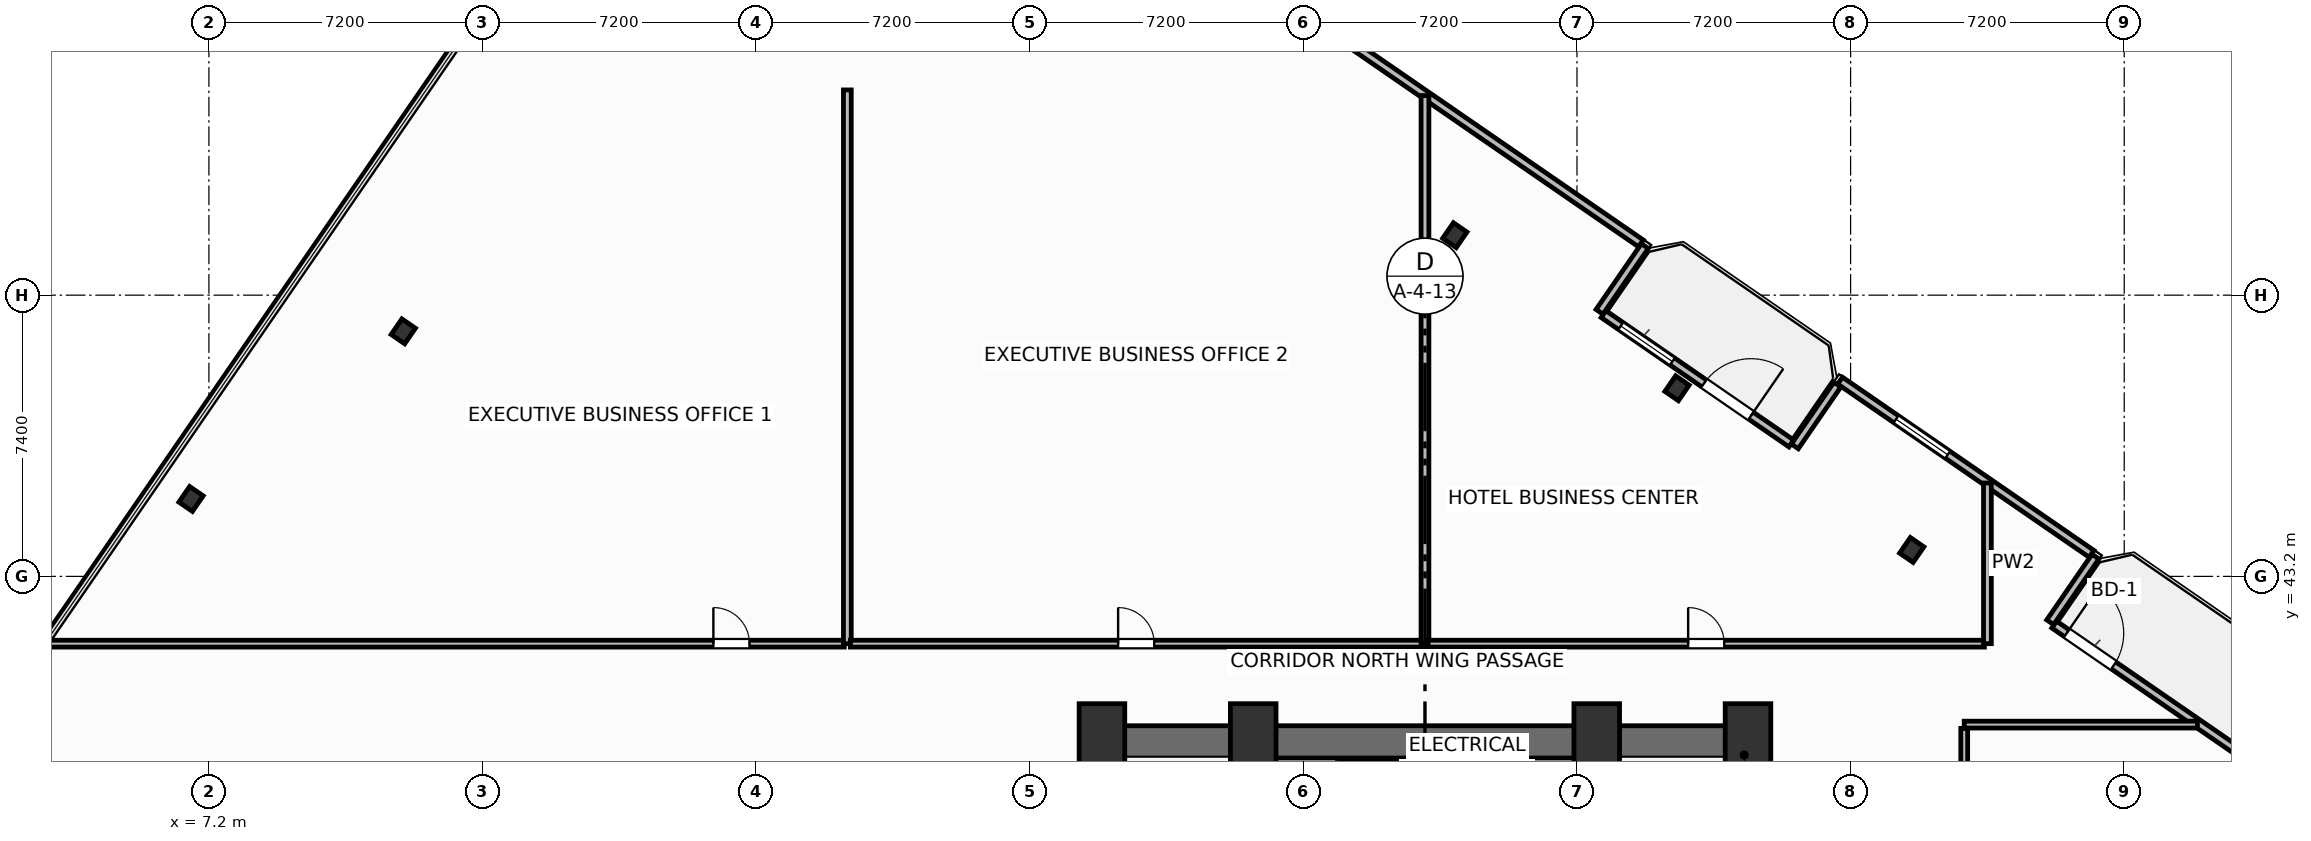
"""IFC4 building model, lengths in metres.
Left out: names, types, materials, properties, quantities, classifications, styles, units other than length and angle.
Written with IfcOpenShell. Run it as: python <this file> out.ifc"""

import sys

from ifc_helpers import new_model, si_unit, direction, frame, frame_2d, origin, origin_2d, place, context, subcontext, project, spatial, rectangle, i_section, extrude, element, fill, save


model = new_model("IFC4")
c1 = context("Model", 3, precision=1e-05, world=origin(), true_north=direction((0.0, 1.0)))
c2 = subcontext(c1, "Body", "Model", "MODEL_VIEW")
j1 = project(units=[si_unit("LENGTHUNIT", "METRE"), si_unit("PLANEANGLEUNIT", "RADIAN")], contexts=[c1])
p1 = place(None, origin())
s1 = spatial("IfcSite", under=j1, at=p1, CompositionType="ELEMENT")
p2 = place(p1, origin())
s2 = spatial("IfcBuilding", under=s1, at=p2, CompositionType="ELEMENT")
p3 = place(p2, frame((0.0, 0.0, 45.5)))
s3 = spatial("IfcBuildingStorey", under=s2, at=p3, CompositionType="ELEMENT", Elevation=45.5)
for number, where, z_axis, x_axis in (
    (1, (30.7, 39.05, 0.0), (0.0, 0.0, 1.0), (1.0, 0.0, 0.0)),
    (2, (34.68, 39.05, 0.0), (0.0, 0.0, 1.0), (1.0, 0.0, 0.0)),
    (3, (43.72, 39.05, 0.0), (0.0, 0.0, 1.0), (1.0, 0.0, 0.0)),
    (4, (47.7, 39.05, 0.0), (0.0, 0.0, 1.0), (1.0, 0.0, 0.0)),
):
    element("IfcColumn", number, at=place(p3, frame(where, z_axis=z_axis, x_axis=x_axis)), inside=s3, PredefinedType="COLUMN", context=c2, shape_type="SweptSolid", body=[
        extrude(rectangle(XDim=1.2, YDim=1.6, at=origin_2d()), origin(), (0.0, 0.0, 1.0), 3.7),
    ])
p4 = place(p3, frame((30.28, 38.845, 0.0), z_axis=(0.0, 0.0, 1.0), x_axis=(1.0, 0.0, 0.0)))
e5 = element("IfcWall", 5, at=p4, inside=s3, PredefinedType="SHEAR", context=c2, shape_type="SweptSolid", body=[
    extrude(rectangle(XDim=17.84, YDim=0.85, at=frame_2d((8.92, 0.0))), origin(), (0.0, 0.0, 1.0), 3.45),
])
for number, where, z_axis, x_axis in (
    (6, (30.705, 29.2, 0.0), (0.0, 0.0, 1.0), (0.0, 1.0, 0.0)),
    (7, (47.695, 29.2, 0.0), (0.0, 0.0, 1.0), (0.0, 1.0, 0.0)),
):
    element("IfcWall", number, at=place(p3, frame(where, z_axis=z_axis, x_axis=x_axis)), inside=s3, PredefinedType="SHEAR", context=c2, shape_type="SweptSolid", body=[
        extrude(rectangle(XDim=9.22, YDim=0.85, at=frame_2d((4.61, 0.0))), origin(), (0.0, 0.0, 1.0), 3.45),
    ])
p5 = place(p3, frame((34.64, 29.2, 0.0), z_axis=(0.0, 0.0, 1.0), x_axis=(0.0, 1.0, 0.0)))
e8 = element("IfcWall", 8, at=p5, inside=s3, PredefinedType="SHEAR", context=c2, shape_type="SweptSolid", body=[
    extrude(rectangle(XDim=9.22, YDim=0.25, at=frame_2d((4.61, 0.0))), origin(), (0.0, 0.0, 1.0), 3.45),
])
p6 = place(p5, frame((0.65, 0.0, 0.0)))
e9 = element("IfcOpeningElement", 9, at=p6, cuts=e8, PredefinedType="OPENING", context=c2, shape_type="SweptSolid", body=[
    extrude(rectangle(XDim=1.05, YDim=2.15, at=frame_2d((0.525, 1.075))), frame((0.0, 0.135, 0.0), z_axis=(0.0, -1.0, 0.0), x_axis=(1.0, 0.0, 0.0)), (0.0, 0.0, 1.0), 0.27),
])
p7 = place(p3, frame((43.76, 29.2, 0.0), z_axis=(0.0, 0.0, 1.0), x_axis=(0.0, 1.0, 0.0)))
e10 = element("IfcWall", 10, at=p7, inside=s3, PredefinedType="SHEAR", context=c2, shape_type="SweptSolid", body=[
    extrude(rectangle(XDim=9.22, YDim=0.25, at=frame_2d((4.61, 0.0))), origin(), (0.0, 0.0, 1.0), 3.45),
])
p8 = place(p7, frame((0.65, 0.0, 0.0)))
e11 = element("IfcOpeningElement", 11, at=p8, cuts=e10, PredefinedType="OPENING", context=c2, shape_type="SweptSolid", body=[
    extrude(rectangle(XDim=1.05, YDim=2.15, at=frame_2d((0.525, 1.075))), frame((0.0, 0.135, 0.0), z_axis=(0.0, -1.0, 0.0), x_axis=(1.0, 0.0, 0.0)), (0.0, 0.0, 1.0), 0.27),
])
for number, where, z_axis, x_axis in (
    (12, (52.009, 43.896, 0.0), (0.0, 0.0, 1.0), (0.824, -0.567, 0.0)),
    (13, (45.833, 48.15, 0.0), (0.0, 0.0, 1.0), (0.824, -0.567, 0.0)),
    (14, (39.985, 52.177, 0.0), (0.0, 0.0, 1.0), (0.824, -0.567, 0.0)),
    (15, (12.315, 49.647, 0.0), (0.0, 0.0, 1.0), (0.824, -0.567, 0.0)),
    (16, (6.73, 45.238, 0.0), (0.0, 0.0, 1.0), (0.824, -0.567, 0.0)),
):
    element("IfcColumn", number, at=place(p3, frame(where, z_axis=z_axis, x_axis=x_axis)), inside=s3, PredefinedType="COLUMN", context=c2, shape_type="SweptSolid", body=[
        extrude(i_section(OverallWidth=0.432, OverallDepth=0.498, WebThickness=0.056, FlangeThickness=0.089, FilletRadius=0.025, at=origin_2d()), origin(), (0.0, 0.0, 1.0), 3.7),
    ])
p9 = place(p3, frame((43.898, 50.102, 0.0), z_axis=(0.0, 0.0, 1.0), x_axis=(0.823534636215, -0.567265989598, 0.0)))
e17 = element("IfcWall", 17, at=p9, inside=s3, PredefinedType="SOLIDWALL", context=c2, shape_type="SweptSolid", body=[
    extrude(rectangle(XDim=6.0, YDim=0.22, at=frame_2d((3.0, 0.0))), origin(), (0.0, 0.0, 1.0), 2.73),
])
p10 = place(p9, frame((3.212, 0.0, 0.0)))
e18 = element("IfcOpeningElement", 18, at=p10, cuts=e17, PredefinedType="OPENING", context=c2, shape_type="SweptSolid", body=[
    extrude(rectangle(XDim=1.5, YDim=2.25, at=frame_2d((0.75, 1.125))), frame((0.0, 0.12, 0.0), z_axis=(0.0, -1.0, 0.0), x_axis=(1.0, 0.0, 0.0)), (0.0, 0.0, 1.0), 0.24),
])
p11 = place(p9, frame((0.55, 0.0, 0.75)))
e19 = element("IfcOpeningElement", 19, at=p11, cuts=e17, PredefinedType="OPENING", context=c2, shape_type="SweptSolid", body=[
    extrude(rectangle(XDim=1.65, YDim=1.65, at=frame_2d((0.825, 0.825))), frame((0.0, 0.12, 0.0), z_axis=(0.0, -1.0, 0.0), x_axis=(1.0, 0.0, 0.0)), (0.0, 0.0, 1.0), 0.24),
])
p12 = place(p3, frame((55.757, 41.933, 0.0), z_axis=(0.0, 0.0, 1.0), x_axis=(0.823534636215, -0.567265989598, 0.0)))
e20 = element("IfcWall", 20, at=p12, inside=s3, PredefinedType="SOLIDWALL", context=c2, shape_type="SweptSolid", body=[
    extrude(rectangle(XDim=6.0, YDim=0.22, at=frame_2d((3.0, 0.0))), origin(), (0.0, 0.0, 1.0), 2.73),
])
p13 = place(p12, frame((0.4, 0.0, 0.0)))
e21 = element("IfcOpeningElement", 21, at=p13, cuts=e20, PredefinedType="OPENING", context=c2, shape_type="SweptSolid", body=[
    extrude(rectangle(XDim=1.5, YDim=2.25, at=frame_2d((0.75, 1.125))), frame((0.0, 0.12, 0.0), z_axis=(0.0, -1.0, 0.0), x_axis=(1.0, 0.0, 0.0)), (0.0, 0.0, 1.0), 0.24),
])
p14 = place(p3, frame((55.653, 41.993, 0.0), z_axis=(0.0, 0.0, 1.0), x_axis=(0.567273696173, 0.823529327729, 0.0)))
e22 = element("IfcWall", 22, at=p14, inside=s3, PredefinedType="SOLIDWALL", context=c2, shape_type="SweptSolid", body=[
    extrude(rectangle(XDim=2.1, YDim=0.22, at=frame_2d((1.05, 0.0))), origin(), (0.0, 0.0, 1.0), 2.73),
])
p15 = place(p3, frame((56.741, 43.793, 0.0), z_axis=(0.0, 0.0, 1.0), x_axis=(-0.823530942962, 0.56727135128, 0.0)))
e23 = element("IfcWall", 23, at=p15, inside=s3, PredefinedType="SOLIDWALL", context=c2, shape_type="SweptSolid", body=[
    extrude(rectangle(XDim=8.035, YDim=0.22, at=frame_2d((4.018, 0.0))), origin(), (0.0, 0.0, 1.0), 2.73),
])
p16 = place(p15, frame((4.597, 0.0, 0.8)))
e24 = element("IfcOpeningElement", 24, at=p16, cuts=e23, PredefinedType="OPENING", context=c2, shape_type="SweptSolid", body=[
    extrude(rectangle(XDim=1.65, YDim=1.65, at=frame_2d((0.825, 0.825))), frame((0.0, 0.12, 0.0), z_axis=(0.0, -1.0, 0.0), x_axis=(1.0, 0.0, 0.0)), (0.0, 0.0, 1.0), 0.24),
])
p17 = place(p3, frame((50.053, 48.248, 0.0), z_axis=(0.0, 0.0, 1.0), x_axis=(-0.567273565974, -0.823529417415, 0.0)))
e25 = element("IfcWall", 25, at=p17, inside=s3, PredefinedType="SOLIDWALL", context=c2, shape_type="SweptSolid", body=[
    extrude(rectangle(XDim=1.975, YDim=0.22, at=frame_2d((0.988, 0.0))), origin(), (0.0, 0.0, 1.0), 2.73),
])
p18 = place(p3, frame((43.794, 50.161, 0.0), z_axis=(0.0, 0.0, 1.0), x_axis=(0.567352541689, 0.823475010816, 0.0)))
e26 = element("IfcWall", 26, at=p18, inside=s3, PredefinedType="SOLIDWALL", context=c2, shape_type="SweptSolid", body=[
    extrude(rectangle(XDim=2.1, YDim=0.22, at=frame_2d((1.05, 0.0))), origin(), (0.0, 0.0, 1.0), 2.73),
])
p19 = place(p3, frame((44.882, 51.962, 0.0), z_axis=(0.0, 0.0, 1.0), x_axis=(-0.823534427573, 0.567266292497, 0.0)))
e27 = element("IfcWall", 27, at=p19, inside=s3, PredefinedType="SOLIDWALL", context=c2, shape_type="SweptSolid", body=[
    extrude(rectangle(XDim=23.147, YDim=0.22, at=frame_2d((11.574, 0.0))), origin(), (0.0, 0.0, 1.0), 2.73),
])
p20 = place(p19, frame((10.749, 0.0, 0.8)))
e28 = element("IfcOpeningElement", 28, at=p20, cuts=e27, PredefinedType="OPENING", context=c2, shape_type="SweptSolid", body=[
    extrude(rectangle(XDim=1.65, YDim=1.65, at=frame_2d((0.825, 0.825))), frame((0.0, 0.12, 0.0), z_axis=(0.0, -1.0, 0.0), x_axis=(1.0, 0.0, 0.0)), (0.0, 0.0, 1.0), 0.24),
])
p21 = place(p3, frame((2.921, 41.43, 0.0), z_axis=(0.0, 0.0, 1.0), x_axis=(1.0, 0.0, 0.0)))
e29 = element("IfcWall", 29, at=p21, inside=s3, PredefinedType="PARTITIONING", context=c2, shape_type="SweptSolid", body=[
    extrude(rectangle(XDim=20.999, YDim=0.18, at=frame_2d((10.5, 0.0))), origin(), (0.0, 0.0, 1.0), 3.45),
])
p22 = place(p21, frame((17.554, 0.0, 0.0)))
e30 = element("IfcOpeningElement", 30, at=p22, cuts=e29, PredefinedType="OPENING", context=c2, shape_type="SweptSolid", body=[
    extrude(rectangle(XDim=0.95, YDim=2.05, at=frame_2d((0.475, 1.025))), frame((0.0, 0.1, 0.0), z_axis=(0.0, -1.0, 0.0), x_axis=(1.0, 0.0, 0.0)), (0.0, 0.0, 1.0), 0.2),
])
p23 = place(p3, frame((24.0, 41.43, 0.0), z_axis=(0.0, 0.0, 1.0), x_axis=(0.0, 1.0, 0.0)))
e31 = element("IfcWall", 31, at=p23, inside=s3, PredefinedType="PARTITIONING", context=c2, shape_type="SweptSolid", body=[
    extrude(rectangle(XDim=14.57, YDim=0.205, at=frame_2d((7.285, 0.0))), origin(), (0.0, 0.0, 1.0), 3.45),
])
p24 = place(p3, frame((24.08, 41.43, 0.0), z_axis=(0.0, 0.0, 1.0), x_axis=(1.0, 0.0, 0.0)))
e32 = element("IfcWall", 32, at=p24, inside=s3, PredefinedType="PARTITIONING", context=c2, shape_type="SweptSolid", body=[
    extrude(rectangle(XDim=15.04, YDim=0.18, at=frame_2d((7.52, 0.0))), origin(), (0.0, 0.0, 1.0), 3.45),
])
p25 = place(p24, frame((7.045, 0.0, 0.0)))
e33 = element("IfcOpeningElement", 33, at=p25, cuts=e32, PredefinedType="OPENING", context=c2, shape_type="SweptSolid", body=[
    extrude(rectangle(XDim=0.95, YDim=2.05, at=frame_2d((0.475, 1.025))), frame((0.0, 0.1, 0.0), z_axis=(0.0, -1.0, 0.0), x_axis=(1.0, 0.0, 0.0)), (0.0, 0.0, 1.0), 0.2),
])
p26 = place(p3, frame((39.2, 41.43, 0.0), z_axis=(0.0, 0.0, 1.0), x_axis=(0.0, 1.0, 0.0)))
e34 = element("IfcWall", 34, at=p26, inside=s3, PredefinedType="PARTITIONING", context=c2, shape_type="SweptSolid", body=[
    extrude(rectangle(XDim=14.421, YDim=0.205, at=frame_2d((7.211, 0.0))), origin(), (0.0, 0.0, 1.0), 3.45),
])
p27 = place(p3, frame((39.28, 41.43, 0.0), z_axis=(0.0, 0.0, 1.0), x_axis=(1.0, 0.0, 0.0)))
e35 = element("IfcWall", 35, at=p27, inside=s3, PredefinedType="PARTITIONING", context=c2, shape_type="SweptSolid", body=[
    extrude(rectangle(XDim=14.64, YDim=0.18, at=frame_2d((7.32, 0.0))), origin(), (0.0, 0.0, 1.0), 3.45),
])
p28 = place(p27, frame((6.845, 0.0, 0.0)))
e36 = element("IfcOpeningElement", 36, at=p28, cuts=e35, PredefinedType="OPENING", context=c2, shape_type="SweptSolid", body=[
    extrude(rectangle(XDim=0.95, YDim=2.05, at=frame_2d((0.475, 1.025))), frame((0.0, 0.1, 0.0), z_axis=(0.0, -1.0, 0.0), x_axis=(1.0, 0.0, 0.0)), (0.0, 0.0, 1.0), 0.2),
])
p29 = place(p3, frame((54.0, 41.43, 0.0), z_axis=(0.0, 0.0, 1.0), x_axis=(0.0, 1.0, 0.0)))
e37 = element("IfcWall", 37, at=p29, inside=s3, PredefinedType="PARTITIONING", context=c2, shape_type="SweptSolid", body=[
    extrude(rectangle(XDim=4.227, YDim=0.205, at=frame_2d((2.113, 0.0))), origin(), (0.0, 0.0, 1.0), 3.45),
])
p30 = place(p3, frame((53.39, 27.53, 0.0), z_axis=(0.0, 0.0, 1.0), x_axis=(0.0, 1.0, 0.0)))
e38 = element("IfcWall", 38, at=p30, inside=s3, PredefinedType="PARTITIONING", context=c2, shape_type="SweptSolid", body=[
    extrude(rectangle(XDim=11.67, YDim=0.18, at=frame_2d((5.835, 0.0))), origin(), (0.0, 0.0, 1.0), 3.45),
])
p31 = place(p30, frame((5.8, 0.0, 0.0)))
e39 = element("IfcOpeningElement", 39, at=p31, cuts=e38, PredefinedType="OPENING", context=c2, shape_type="SweptSolid", body=[
    extrude(rectangle(XDim=0.92, YDim=2.05, at=frame_2d((0.46, 1.025))), frame((0.0, 0.1, 0.0), z_axis=(0.0, -1.0, 0.0), x_axis=(1.0, 0.0, 0.0)), (0.0, 0.0, 1.0), 0.2),
])
p32 = place(p3, frame((53.39, 39.3, 0.0), z_axis=(0.0, 0.0, 1.0), x_axis=(1.0, 0.0, 0.0)))
e40 = element("IfcWall", 40, at=p32, inside=s3, PredefinedType="PARTITIONING", context=c2, shape_type="SweptSolid", body=[
    extrude(rectangle(XDim=6.136, YDim=0.18, at=frame_2d((3.068, 0.0))), origin(), (0.0, 0.0, 1.0), 3.45),
])
p33 = place(p10, origin())
e41 = element("IfcDoor", 41, at=p33, inside=s3, OperationType="SINGLE_SWING_RIGHT", PredefinedType="DOOR", context=c2, shape_type="SweptSolid", body=[
    extrude(rectangle(XDim=1.5, YDim=2.25, at=frame_2d((0.75, 1.125))), frame((0.0, 0.025, 0.0), z_axis=(0.0, -1.0, 0.0), x_axis=(1.0, 0.0, 0.0)), (0.0, 0.0, 1.0), 0.05),
])
fill(e18, e41)
p34 = place(p11, origin())
e42 = element("IfcWindow", 42, at=p34, inside=s3, PartitioningType="SINGLE_PANEL", PredefinedType="WINDOW", context=c2, shape_type="SweptSolid", body=[
    extrude(rectangle(XDim=1.65, YDim=1.65, at=frame_2d((0.825, 0.825))), frame((0.0, 0.03, 0.0), z_axis=(0.0, -1.0, 0.0), x_axis=(1.0, 0.0, 0.0)), (0.0, 0.0, 1.0), 0.06),
])
fill(e19, e42)
p35 = place(p13, origin())
e43 = element("IfcDoor", 43, at=p35, inside=s3, OperationType="SINGLE_SWING_LEFT", PredefinedType="DOOR", context=c2, shape_type="SweptSolid", body=[
    extrude(rectangle(XDim=1.5, YDim=2.25, at=frame_2d((0.75, 1.125))), frame((0.0, 0.025, 0.0), z_axis=(0.0, -1.0, 0.0), x_axis=(1.0, 0.0, 0.0)), (0.0, 0.0, 1.0), 0.05),
])
fill(e21, e43)
p36 = place(p16, origin())
e44 = element("IfcWindow", 44, at=p36, inside=s3, PartitioningType="SINGLE_PANEL", PredefinedType="WINDOW", context=c2, shape_type="SweptSolid", body=[
    extrude(rectangle(XDim=1.65, YDim=1.65, at=frame_2d((0.825, 0.825))), frame((0.0, 0.03, 0.0), z_axis=(0.0, -1.0, 0.0), x_axis=(1.0, 0.0, 0.0)), (0.0, 0.0, 1.0), 0.06),
])
fill(e24, e44)
p37 = place(p22, origin())
e45 = element("IfcDoor", 45, at=p37, inside=s3, OperationType="SINGLE_SWING_LEFT", PredefinedType="DOOR", context=c2, shape_type="SweptSolid", body=[
    extrude(rectangle(XDim=0.95, YDim=2.05, at=frame_2d((0.475, 1.025))), frame((0.0, 0.025, 0.0), z_axis=(0.0, -1.0, 0.0), x_axis=(1.0, 0.0, 0.0)), (0.0, 0.0, 1.0), 0.05),
])
fill(e30, e45)
p38 = place(p25, origin())
e46 = element("IfcDoor", 46, at=p38, inside=s3, OperationType="SINGLE_SWING_LEFT", PredefinedType="DOOR", context=c2, shape_type="SweptSolid", body=[
    extrude(rectangle(XDim=0.95, YDim=2.05, at=frame_2d((0.475, 1.025))), frame((0.0, 0.025, 0.0), z_axis=(0.0, -1.0, 0.0), x_axis=(1.0, 0.0, 0.0)), (0.0, 0.0, 1.0), 0.05),
])
fill(e33, e46)
p39 = place(p28, origin())
e47 = element("IfcDoor", 47, at=p39, inside=s3, OperationType="SINGLE_SWING_LEFT", PredefinedType="DOOR", context=c2, shape_type="SweptSolid", body=[
    extrude(rectangle(XDim=0.95, YDim=2.05, at=frame_2d((0.475, 1.025))), frame((0.0, 0.025, 0.0), z_axis=(0.0, -1.0, 0.0), x_axis=(1.0, 0.0, 0.0)), (0.0, 0.0, 1.0), 0.05),
])
fill(e36, e47)
save(model, sys.argv[1])
